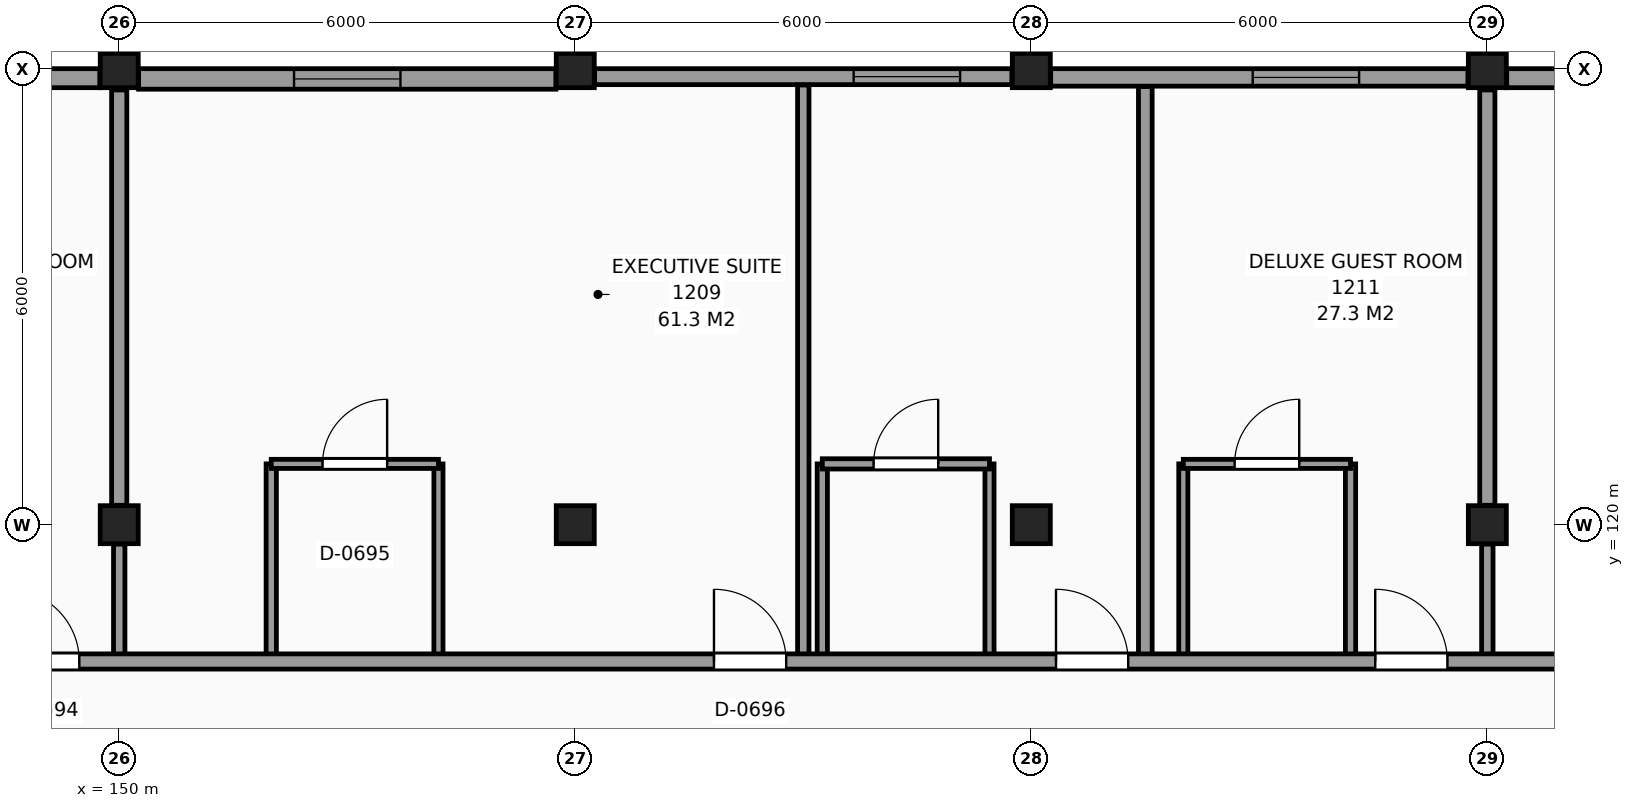
"""IFC4 building model, lengths in metres.
Left out: names, types, materials, properties, quantities, classifications, styles, units other than length and angle.
Written with IfcOpenShell. Run it as: python <this file> out.ifc"""

import sys

from ifc_helpers import new_model, si_unit, direction, frame, frame_2d, origin, origin_2d, place, context, subcontext, project, spatial, rectangle, extrude, element, fill, save


model = new_model("IFC4")
c1 = context("Model", 3, precision=1e-05, world=origin(), true_north=direction((0.0, 1.0)))
c2 = subcontext(c1, "Body", "Model", "MODEL_VIEW")
j1 = project(units=[si_unit("LENGTHUNIT", "METRE"), si_unit("PLANEANGLEUNIT", "RADIAN")], contexts=[c1])
p1 = place(None, origin())
s1 = spatial("IfcSite", under=j1, at=p1, CompositionType="ELEMENT")
p2 = place(p1, origin())
s2 = spatial("IfcBuilding", under=s1, at=p2, CompositionType="ELEMENT")
p3 = place(p2, frame((0.0, 0.0, 48.0)))
s3 = spatial("IfcBuildingStorey", under=s2, at=p3, CompositionType="ELEMENT", Elevation=48.0)
for number, where, z_axis, x_axis in (
    (1, (150.0, 120.0, 0.0), (0.0, 0.0, 1.0), (1.0, 0.0, 0.0)),
    (2, (150.0, 126.0, 0.0), (0.0, 0.0, 1.0), (1.0, 0.0, 0.0)),
    (3, (156.0, 120.0, 0.0), (0.0, 0.0, 1.0), (1.0, 0.0, 0.0)),
    (4, (156.0, 126.0, 0.0), (0.0, 0.0, 1.0), (1.0, 0.0, 0.0)),
    (5, (162.0, 120.0, 0.0), (0.0, 0.0, 1.0), (1.0, 0.0, 0.0)),
    (6, (162.0, 126.0, 0.0), (0.0, 0.0, 1.0), (1.0, 0.0, 0.0)),
    (7, (168.0, 120.0, 0.0), (0.0, 0.0, 1.0), (1.0, 0.0, 0.0)),
    (8, (168.0, 126.0, 0.0), (0.0, 0.0, 1.0), (1.0, 0.0, 0.0)),
):
    element("IfcColumn", number, at=place(p3, frame(where, z_axis=z_axis, x_axis=x_axis)), inside=s3, PredefinedType="COLUMN", context=c2, shape_type="SweptSolid", body=[
        extrude(rectangle(XDim=0.5, YDim=0.5, at=origin_2d()), origin(), (0.0, 0.0, 1.0), 3.3),
    ])
p4 = place(p3, frame((173.745, 125.875, 0.0), z_axis=(0.0, 0.0, 1.0), x_axis=(-1.0, 0.0, 0.0)))
e9 = element("IfcWall", 9, at=p4, inside=s3, PredefinedType="SOLIDWALL", context=c2, shape_type="SweptSolid", body=[
    extrude(rectangle(XDim=5.49, YDim=0.25, at=frame_2d((2.745, 0.0))), origin(), (0.0, 0.0, 1.0), 2.4),
])
p5 = place(p3, frame((167.745, 125.885, 0.0), z_axis=(0.0, 0.0, 1.0), x_axis=(-1.0, 0.0, 0.0)))
e10 = element("IfcWall", 10, at=p5, inside=s3, PredefinedType="SOLIDWALL", context=c2, shape_type="SweptSolid", body=[
    extrude(rectangle(XDim=5.49, YDim=0.23, at=frame_2d((2.745, 0.0))), origin(), (0.0, 0.0, 1.0), 2.4),
])
p6 = place(p5, frame((1.432, 0.0, 0.8)))
e11 = element("IfcOpeningElement", 11, at=p6, cuts=e10, PredefinedType="OPENING", context=c2, shape_type="SweptSolid", body=[
    extrude(rectangle(XDim=1.4, YDim=1.4, at=frame_2d((0.7, 0.7))), frame((0.0, 0.125, 0.0), z_axis=(0.0, -1.0, 0.0), x_axis=(1.0, 0.0, 0.0)), (0.0, 0.0, 1.0), 0.25),
])
p7 = place(p3, frame((161.745, 125.895, 0.0), z_axis=(0.0, 0.0, 1.0), x_axis=(-1.0, 0.0, 0.0)))
e12 = element("IfcWall", 12, at=p7, inside=s3, PredefinedType="SOLIDWALL", context=c2, shape_type="SweptSolid", body=[
    extrude(rectangle(XDim=5.49, YDim=0.21, at=frame_2d((2.745, 0.0))), origin(), (0.0, 0.0, 1.0), 2.4),
])
p8 = place(p7, frame((0.682, 0.0, 0.8)))
e13 = element("IfcOpeningElement", 13, at=p8, cuts=e12, PredefinedType="OPENING", context=c2, shape_type="SweptSolid", body=[
    extrude(rectangle(XDim=1.4, YDim=1.4, at=frame_2d((0.7, 0.7))), frame((0.0, 0.115, 0.0), z_axis=(0.0, -1.0, 0.0), x_axis=(1.0, 0.0, 0.0)), (0.0, 0.0, 1.0), 0.23),
])
p9 = place(p3, frame((155.745, 125.865, 0.0), z_axis=(0.0, 0.0, 1.0), x_axis=(-1.0, 0.0, 0.0)))
e14 = element("IfcWall", 14, at=p9, inside=s3, PredefinedType="SOLIDWALL", context=c2, shape_type="SweptSolid", body=[
    extrude(rectangle(XDim=5.49, YDim=0.27, at=frame_2d((2.745, 0.0))), origin(), (0.0, 0.0, 1.0), 2.4),
])
p10 = place(p9, frame((2.045, 0.0, 0.8)))
e15 = element("IfcOpeningElement", 15, at=p10, cuts=e14, PredefinedType="OPENING", context=c2, shape_type="SweptSolid", body=[
    extrude(rectangle(XDim=1.4, YDim=1.4, at=frame_2d((0.7, 0.7))), frame((0.0, 0.145, 0.0), z_axis=(0.0, -1.0, 0.0), x_axis=(1.0, 0.0, 0.0)), (0.0, 0.0, 1.0), 0.29),
])
p11 = place(p3, frame((149.745, 125.875, 0.0), z_axis=(0.0, 0.0, 1.0), x_axis=(-1.0, 0.0, 0.0)))
e16 = element("IfcWall", 16, at=p11, inside=s3, PredefinedType="SOLIDWALL", context=c2, shape_type="SweptSolid", body=[
    extrude(rectangle(XDim=5.49, YDim=0.25, at=frame_2d((2.745, 0.0))), origin(), (0.0, 0.0, 1.0), 2.4),
])
p12 = place(p11, frame((1.432, 0.0, 0.8)))
e17 = element("IfcOpeningElement", 17, at=p12, cuts=e16, PredefinedType="OPENING", context=c2, shape_type="SweptSolid", body=[
    extrude(rectangle(XDim=1.4, YDim=1.4, at=frame_2d((0.7, 0.7))), frame((0.0, 0.135, 0.0), z_axis=(0.0, -1.0, 0.0), x_axis=(1.0, 0.0, 0.0)), (0.0, 0.0, 1.0), 0.27),
])
p13 = place(p3, frame((150.0, 118.2, 0.0), z_axis=(0.0, 0.0, 1.0), x_axis=(0.0, 1.0, 0.0)))
e18 = element("IfcWall", 18, at=p13, inside=s3, PredefinedType="PARTITIONING", context=c2, shape_type="SweptSolid", body=[
    extrude(rectangle(XDim=1.545, YDim=0.15, at=frame_2d((0.772, 0.0))), origin(), (0.0, 0.0, 1.0), 2.5),
])
p14 = place(p3, frame((150.0, 120.255, 0.0), z_axis=(0.0, 0.0, 1.0), x_axis=(0.0, 1.0, 0.0)))
e19 = element("IfcWall", 19, at=p14, inside=s3, PredefinedType="PARTITIONING", context=c2, shape_type="SweptSolid", body=[
    extrude(rectangle(XDim=5.465, YDim=0.2, at=frame_2d((2.732, 0.0))), origin(), (0.0, 0.0, 1.0), 2.55),
])
p15 = place(p3, frame((152.0, 118.2, 0.0), z_axis=(0.0, 0.0, 1.0), x_axis=(0.0, 1.0, 0.0)))
e20 = element("IfcWall", 20, at=p15, inside=s3, PredefinedType="PARTITIONING", context=c2, shape_type="SweptSolid", body=[
    extrude(rectangle(XDim=2.6, YDim=0.135, at=frame_2d((1.3, 0.0))), origin(), (0.0, 0.0, 1.0), 3.05),
])
p16 = place(p3, frame((154.2, 118.2, 0.0), z_axis=(0.0, 0.0, 1.0), x_axis=(0.0, 1.0, 0.0)))
e21 = element("IfcWall", 21, at=p16, inside=s3, PredefinedType="PARTITIONING", context=c2, shape_type="SweptSolid", body=[
    extrude(rectangle(XDim=2.6, YDim=0.12, at=frame_2d((1.3, 0.0))), origin(), (0.0, 0.0, 1.0), 3.05),
])
p17 = place(p3, frame((159.0, 118.2, 0.0), z_axis=(0.0, 0.0, 1.0), x_axis=(0.0, 1.0, 0.0)))
e22 = element("IfcWall", 22, at=p17, inside=s3, PredefinedType="PARTITIONING", context=c2, shape_type="SweptSolid", body=[
    extrude(rectangle(XDim=7.585, YDim=0.15, at=frame_2d((3.792, 0.0))), origin(), (0.0, 0.0, 1.0), 3.05),
])
p18 = place(p3, frame((159.25, 118.2, 0.0), z_axis=(0.0, 0.0, 1.0), x_axis=(0.0, 1.0, 0.0)))
e23 = element("IfcWall", 23, at=p18, inside=s3, PredefinedType="PARTITIONING", context=c2, shape_type="SweptSolid", body=[
    extrude(rectangle(XDim=2.6, YDim=0.135, at=frame_2d((1.3, 0.0))), origin(), (0.0, 0.0, 1.0), 3.05),
])
p19 = place(p3, frame((161.45, 118.2, 0.0), z_axis=(0.0, 0.0, 1.0), x_axis=(0.0, 1.0, 0.0)))
e24 = element("IfcWall", 24, at=p19, inside=s3, PredefinedType="PARTITIONING", context=c2, shape_type="SweptSolid", body=[
    extrude(rectangle(XDim=2.6, YDim=0.12, at=frame_2d((1.3, 0.0))), origin(), (0.0, 0.0, 1.0), 3.05),
])
p20 = place(p3, frame((163.5, 118.2, 0.0), z_axis=(0.0, 0.0, 1.0), x_axis=(0.0, 1.0, 0.0)))
e25 = element("IfcWall", 25, at=p20, inside=s3, PredefinedType="PARTITIONING", context=c2, shape_type="SweptSolid", body=[
    extrude(rectangle(XDim=7.565, YDim=0.18, at=frame_2d((3.782, 0.0))), origin(), (0.0, 0.0, 1.0), 3.05),
])
p21 = place(p3, frame((164.0, 118.2, 0.0), z_axis=(0.0, 0.0, 1.0), x_axis=(0.0, 1.0, 0.0)))
e26 = element("IfcWall", 26, at=p21, inside=s3, PredefinedType="PARTITIONING", context=c2, shape_type="SweptSolid", body=[
    extrude(rectangle(XDim=2.6, YDim=0.12, at=frame_2d((1.3, 0.0))), origin(), (0.0, 0.0, 1.0), 3.05),
])
p22 = place(p3, frame((166.2, 118.2, 0.0), z_axis=(0.0, 0.0, 1.0), x_axis=(0.0, 1.0, 0.0)))
e27 = element("IfcWall", 27, at=p22, inside=s3, PredefinedType="PARTITIONING", context=c2, shape_type="SweptSolid", body=[
    extrude(rectangle(XDim=2.6, YDim=0.135, at=frame_2d((1.3, 0.0))), origin(), (0.0, 0.0, 1.0), 3.05),
])
p23 = place(p3, frame((168.0, 118.2, 0.0), z_axis=(0.0, 0.0, 1.0), x_axis=(0.0, 1.0, 0.0)))
e28 = element("IfcWall", 28, at=p23, inside=s3, PredefinedType="PARTITIONING", context=c2, shape_type="SweptSolid", body=[
    extrude(rectangle(XDim=1.545, YDim=0.15, at=frame_2d((0.772, 0.0))), origin(), (0.0, 0.0, 1.0), 2.5),
])
p24 = place(p3, frame((168.0, 120.255, 0.0), z_axis=(0.0, 0.0, 1.0), x_axis=(0.0, 1.0, 0.0)))
e29 = element("IfcWall", 29, at=p24, inside=s3, PredefinedType="PARTITIONING", context=c2, shape_type="SweptSolid", body=[
    extrude(rectangle(XDim=5.465, YDim=0.2, at=frame_2d((2.732, 0.0))), origin(), (0.0, 0.0, 1.0), 2.55),
])
p25 = place(p3, frame((102.235, 118.2, 0.0), z_axis=(0.0, 0.0, 1.0), x_axis=(1.0, 0.0, 0.0)))
e30 = element("IfcWall", 30, at=p25, inside=s3, PredefinedType="PARTITIONING", context=c2, shape_type="SweptSolid", body=[
    extrude(rectangle(XDim=74.265, YDim=0.2, at=frame_2d((37.132, 0.0))), origin(), (0.0, 0.0, 1.0), 3.05),
])
p26 = place(p25, frame((0.49, 0.0, 0.0)))
e31 = element("IfcOpeningElement", 31, at=p26, cuts=e30, PredefinedType="OPENING", context=c2, shape_type="SweptSolid", body=[
    extrude(rectangle(XDim=0.95, YDim=2.1, at=frame_2d((0.475, 1.05))), frame((0.0, 0.11, 0.0), z_axis=(0.0, -1.0, 0.0), x_axis=(1.0, 0.0, 0.0)), (0.0, 0.0, 1.0), 0.22),
])
p27 = place(p25, frame((4.89, 0.0, 0.0)))
e32 = element("IfcOpeningElement", 32, at=p27, cuts=e30, PredefinedType="OPENING", context=c2, shape_type="SweptSolid", body=[
    extrude(rectangle(XDim=0.95, YDim=2.1, at=frame_2d((0.475, 1.05))), frame((0.0, 0.11, 0.0), z_axis=(0.0, -1.0, 0.0), x_axis=(1.0, 0.0, 0.0)), (0.0, 0.0, 1.0), 0.22),
])
p28 = place(p25, frame((12.09, 0.0, 0.0)))
e33 = element("IfcOpeningElement", 33, at=p28, cuts=e30, PredefinedType="OPENING", context=c2, shape_type="SweptSolid", body=[
    extrude(rectangle(XDim=0.95, YDim=2.1, at=frame_2d((0.475, 1.05))), frame((0.0, 0.11, 0.0), z_axis=(0.0, -1.0, 0.0), x_axis=(1.0, 0.0, 0.0)), (0.0, 0.0, 1.0), 0.22),
])
p29 = place(p25, frame((20.34, 0.0, 0.0)))
e34 = element("IfcOpeningElement", 34, at=p29, cuts=e30, PredefinedType="OPENING", context=c2, shape_type="SweptSolid", body=[
    extrude(rectangle(XDim=0.95, YDim=2.1, at=frame_2d((0.475, 1.05))), frame((0.0, 0.11, 0.0), z_axis=(0.0, -1.0, 0.0), x_axis=(1.0, 0.0, 0.0)), (0.0, 0.0, 1.0), 0.22),
])
p30 = place(p25, frame((32.34, 0.0, 0.0)))
e35 = element("IfcOpeningElement", 35, at=p30, cuts=e30, PredefinedType="OPENING", context=c2, shape_type="SweptSolid", body=[
    extrude(rectangle(XDim=0.95, YDim=2.1, at=frame_2d((0.475, 1.05))), frame((0.0, 0.11, 0.0), z_axis=(0.0, -1.0, 0.0), x_axis=(1.0, 0.0, 0.0)), (0.0, 0.0, 1.0), 0.22),
])
p31 = place(p25, frame((34.89, 0.0, 0.0)))
e36 = element("IfcOpeningElement", 36, at=p31, cuts=e30, PredefinedType="OPENING", context=c2, shape_type="SweptSolid", body=[
    extrude(rectangle(XDim=0.95, YDim=2.1, at=frame_2d((0.475, 1.05))), frame((0.0, 0.11, 0.0), z_axis=(0.0, -1.0, 0.0), x_axis=(1.0, 0.0, 0.0)), (0.0, 0.0, 1.0), 0.22),
])
p32 = place(p25, frame((42.09, 0.0, 0.0)))
e37 = element("IfcOpeningElement", 37, at=p32, cuts=e30, PredefinedType="OPENING", context=c2, shape_type="SweptSolid", body=[
    extrude(rectangle(XDim=0.95, YDim=2.1, at=frame_2d((0.475, 1.05))), frame((0.0, 0.11, 0.0), z_axis=(0.0, -1.0, 0.0), x_axis=(1.0, 0.0, 0.0)), (0.0, 0.0, 1.0), 0.22),
])
p33 = place(p25, frame((46.29, 0.0, 0.0)))
e38 = element("IfcOpeningElement", 38, at=p33, cuts=e30, PredefinedType="OPENING", context=c2, shape_type="SweptSolid", body=[
    extrude(rectangle(XDim=0.95, YDim=2.1, at=frame_2d((0.475, 1.05))), frame((0.0, 0.11, 0.0), z_axis=(0.0, -1.0, 0.0), x_axis=(1.0, 0.0, 0.0)), (0.0, 0.0, 1.0), 0.22),
])
p34 = place(p25, frame((55.59, 0.0, 0.0)))
e39 = element("IfcOpeningElement", 39, at=p34, cuts=e30, PredefinedType="OPENING", context=c2, shape_type="SweptSolid", body=[
    extrude(rectangle(XDim=0.95, YDim=2.1, at=frame_2d((0.475, 1.05))), frame((0.0, 0.11, 0.0), z_axis=(0.0, -1.0, 0.0), x_axis=(1.0, 0.0, 0.0)), (0.0, 0.0, 1.0), 0.22),
])
p35 = place(p25, frame((60.09, 0.0, 0.0)))
e40 = element("IfcOpeningElement", 40, at=p35, cuts=e30, PredefinedType="OPENING", context=c2, shape_type="SweptSolid", body=[
    extrude(rectangle(XDim=0.95, YDim=2.1, at=frame_2d((0.475, 1.05))), frame((0.0, 0.11, 0.0), z_axis=(0.0, -1.0, 0.0), x_axis=(1.0, 0.0, 0.0)), (0.0, 0.0, 1.0), 0.22),
])
p36 = place(p25, frame((64.29, 0.0, 0.0)))
e41 = element("IfcOpeningElement", 41, at=p36, cuts=e30, PredefinedType="OPENING", context=c2, shape_type="SweptSolid", body=[
    extrude(rectangle(XDim=0.95, YDim=2.1, at=frame_2d((0.475, 1.05))), frame((0.0, 0.11, 0.0), z_axis=(0.0, -1.0, 0.0), x_axis=(1.0, 0.0, 0.0)), (0.0, 0.0, 1.0), 0.22),
])
p37 = place(p25, frame((68.24, 0.0, 0.0)))
e42 = element("IfcOpeningElement", 42, at=p37, cuts=e30, PredefinedType="OPENING", context=c2, shape_type="SweptSolid", body=[
    extrude(rectangle(XDim=0.95, YDim=2.1, at=frame_2d((0.475, 1.05))), frame((0.0, 0.11, 0.0), z_axis=(0.0, -1.0, 0.0), x_axis=(1.0, 0.0, 0.0)), (0.0, 0.0, 1.0), 0.22),
])
p38 = place(p3, frame((152.0, 120.8, 0.0), z_axis=(0.0, 0.0, 1.0), x_axis=(1.0, 0.0, 0.0)))
e43 = element("IfcWall", 43, at=p38, inside=s3, PredefinedType="PARTITIONING", context=c2, shape_type="SweptSolid", body=[
    extrude(rectangle(XDim=2.2, YDim=0.12, at=frame_2d((1.1, 0.0))), origin(), (0.0, 0.0, 1.0), 3.05),
])
p39 = place(p38, frame((0.675, 0.0, 0.0)))
e44 = element("IfcOpeningElement", 44, at=p39, cuts=e43, PredefinedType="OPENING", context=c2, shape_type="SweptSolid", body=[
    extrude(rectangle(XDim=0.85, YDim=2.1, at=frame_2d((0.425, 1.05))), frame((0.0, 0.07, 0.0), z_axis=(0.0, -1.0, 0.0), x_axis=(1.0, 0.0, 0.0)), (0.0, 0.0, 1.0), 0.14),
])
p40 = place(p3, frame((159.25, 120.8, 0.0), z_axis=(0.0, 0.0, 1.0), x_axis=(1.0, 0.0, 0.0)))
e45 = element("IfcWall", 45, at=p40, inside=s3, PredefinedType="PARTITIONING", context=c2, shape_type="SweptSolid", body=[
    extrude(rectangle(XDim=2.2, YDim=0.135, at=frame_2d((1.1, 0.0))), origin(), (0.0, 0.0, 1.0), 3.05),
])
p41 = place(p40, frame((0.675, 0.0, 0.0)))
e46 = element("IfcOpeningElement", 46, at=p41, cuts=e45, PredefinedType="OPENING", context=c2, shape_type="SweptSolid", body=[
    extrude(rectangle(XDim=0.85, YDim=2.1, at=frame_2d((0.425, 1.05))), frame((0.0, 0.078, 0.0), z_axis=(0.0, -1.0, 0.0), x_axis=(1.0, 0.0, 0.0)), (0.0, 0.0, 1.0), 0.155),
])
p42 = place(p3, frame((164.0, 120.8, 0.0), z_axis=(0.0, 0.0, 1.0), x_axis=(1.0, 0.0, 0.0)))
e47 = element("IfcWall", 47, at=p42, inside=s3, PredefinedType="PARTITIONING", context=c2, shape_type="SweptSolid", body=[
    extrude(rectangle(XDim=2.2, YDim=0.12, at=frame_2d((1.1, 0.0))), origin(), (0.0, 0.0, 1.0), 3.05),
])
p43 = place(p42, frame((0.675, 0.0, 0.0)))
e48 = element("IfcOpeningElement", 48, at=p43, cuts=e47, PredefinedType="OPENING", context=c2, shape_type="SweptSolid", body=[
    extrude(rectangle(XDim=0.85, YDim=2.1, at=frame_2d((0.425, 1.05))), frame((0.0, 0.07, 0.0), z_axis=(0.0, -1.0, 0.0), x_axis=(1.0, 0.0, 0.0)), (0.0, 0.0, 1.0), 0.14),
])
p44 = place(p10, origin())
e49 = element("IfcWindow", 49, at=p44, inside=s3, PartitioningType="SINGLE_PANEL", PredefinedType="WINDOW", context=c2, shape_type="SweptSolid", body=[
    extrude(rectangle(XDim=1.4, YDim=1.4, at=frame_2d((0.7, 0.7))), frame((0.0, 0.03, 0.0), z_axis=(0.0, -1.0, 0.0), x_axis=(1.0, 0.0, 0.0)), (0.0, 0.0, 1.0), 0.06),
])
fill(e15, e49)
p45 = place(p8, origin())
e50 = element("IfcWindow", 50, at=p45, inside=s3, PartitioningType="SINGLE_PANEL", PredefinedType="WINDOW", context=c2, shape_type="SweptSolid", body=[
    extrude(rectangle(XDim=1.4, YDim=1.4, at=frame_2d((0.7, 0.7))), frame((0.0, 0.03, 0.0), z_axis=(0.0, -1.0, 0.0), x_axis=(1.0, 0.0, 0.0)), (0.0, 0.0, 1.0), 0.06),
])
fill(e13, e50)
p46 = place(p6, origin())
e51 = element("IfcWindow", 51, at=p46, inside=s3, PartitioningType="SINGLE_PANEL", PredefinedType="WINDOW", context=c2, shape_type="SweptSolid", body=[
    extrude(rectangle(XDim=1.4, YDim=1.4, at=frame_2d((0.7, 0.7))), frame((0.0, 0.03, 0.0), z_axis=(0.0, -1.0, 0.0), x_axis=(1.0, 0.0, 0.0)), (0.0, 0.0, 1.0), 0.06),
])
fill(e11, e51)
p47 = place(p33, origin())
e52 = element("IfcDoor", 52, at=p47, inside=s3, OperationType="SINGLE_SWING_LEFT", PredefinedType="DOOR", context=c2, shape_type="SweptSolid", body=[
    extrude(rectangle(XDim=0.95, YDim=2.1, at=frame_2d((0.475, 1.05))), frame((0.0, 0.025, 0.0), z_axis=(0.0, -1.0, 0.0), x_axis=(1.0, 0.0, 0.0)), (0.0, 0.0, 1.0), 0.05),
])
fill(e38, e52)
p48 = place(p39, origin())
e53 = element("IfcDoor", 53, at=p48, inside=s3, OperationType="SINGLE_SWING_RIGHT", PredefinedType="DOOR", context=c2, shape_type="SweptSolid", body=[
    extrude(rectangle(XDim=0.85, YDim=2.1, at=frame_2d((0.425, 1.05))), frame((0.0, 0.025, 0.0), z_axis=(0.0, -1.0, 0.0), x_axis=(1.0, 0.0, 0.0)), (0.0, 0.0, 1.0), 0.05),
])
fill(e44, e53)
p49 = place(p34, origin())
e54 = element("IfcDoor", 54, at=p49, inside=s3, OperationType="SINGLE_SWING_LEFT", PredefinedType="DOOR", context=c2, shape_type="SweptSolid", body=[
    extrude(rectangle(XDim=0.95, YDim=2.1, at=frame_2d((0.475, 1.05))), frame((0.0, 0.025, 0.0), z_axis=(0.0, -1.0, 0.0), x_axis=(1.0, 0.0, 0.0)), (0.0, 0.0, 1.0), 0.05),
])
fill(e39, e54)
p50 = place(p41, origin())
e55 = element("IfcDoor", 55, at=p50, inside=s3, OperationType="SINGLE_SWING_RIGHT", PredefinedType="DOOR", context=c2, shape_type="SweptSolid", body=[
    extrude(rectangle(XDim=0.85, YDim=2.1, at=frame_2d((0.425, 1.05))), frame((0.0, 0.025, 0.0), z_axis=(0.0, -1.0, 0.0), x_axis=(1.0, 0.0, 0.0)), (0.0, 0.0, 1.0), 0.05),
])
fill(e46, e55)
p51 = place(p35, origin())
e56 = element("IfcDoor", 56, at=p51, inside=s3, OperationType="SINGLE_SWING_LEFT", PredefinedType="DOOR", context=c2, shape_type="SweptSolid", body=[
    extrude(rectangle(XDim=0.95, YDim=2.1, at=frame_2d((0.475, 1.05))), frame((0.0, 0.025, 0.0), z_axis=(0.0, -1.0, 0.0), x_axis=(1.0, 0.0, 0.0)), (0.0, 0.0, 1.0), 0.05),
])
fill(e40, e56)
p52 = place(p43, origin())
e57 = element("IfcDoor", 57, at=p52, inside=s3, OperationType="SINGLE_SWING_RIGHT", PredefinedType="DOOR", context=c2, shape_type="SweptSolid", body=[
    extrude(rectangle(XDim=0.85, YDim=2.1, at=frame_2d((0.425, 1.05))), frame((0.0, 0.025, 0.0), z_axis=(0.0, -1.0, 0.0), x_axis=(1.0, 0.0, 0.0)), (0.0, 0.0, 1.0), 0.05),
])
fill(e48, e57)
p53 = place(p36, origin())
e58 = element("IfcDoor", 58, at=p53, inside=s3, OperationType="SINGLE_SWING_LEFT", PredefinedType="DOOR", context=c2, shape_type="SweptSolid", body=[
    extrude(rectangle(XDim=0.95, YDim=2.1, at=frame_2d((0.475, 1.05))), frame((0.0, 0.025, 0.0), z_axis=(0.0, -1.0, 0.0), x_axis=(1.0, 0.0, 0.0)), (0.0, 0.0, 1.0), 0.05),
])
fill(e41, e58)
save(model, sys.argv[1])
